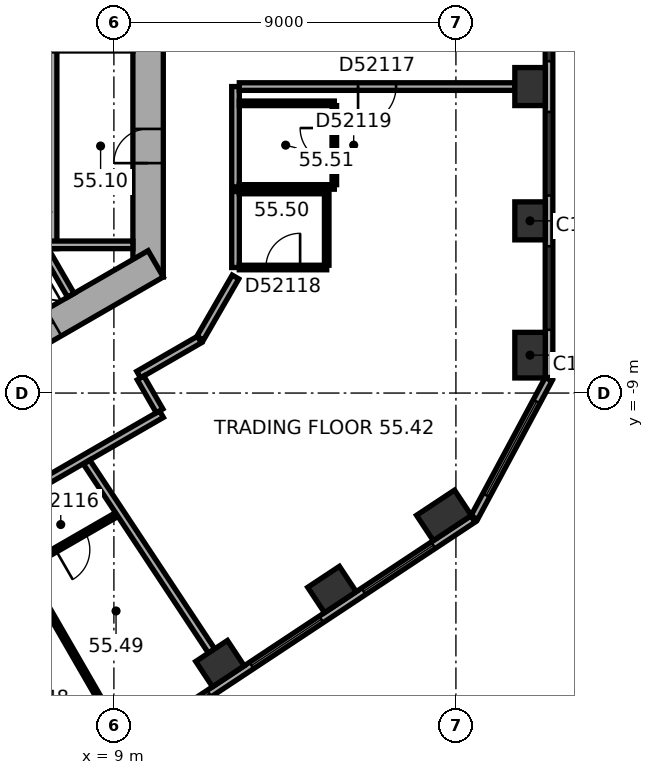
"""IFC4 building model, lengths in metres.
Left out: names, types, materials, properties, quantities, classifications, styles, units other than length and angle.
Written with IfcOpenShell. Run it as: python <this file> out.ifc"""

import sys

from ifc_helpers import new_model, si_unit, direction, frame, frame_2d, origin, origin_2d, place, context, subcontext, project, spatial, rectangle, extrude, element, fill, save


model = new_model("IFC4")
c1 = context("Model", 3, precision=1e-05, world=origin(), true_north=direction((0.0, 1.0)))
c2 = subcontext(c1, "Body", "Model", "MODEL_VIEW")
j1 = project(units=[si_unit("LENGTHUNIT", "METRE"), si_unit("PLANEANGLEUNIT", "RADIAN")], contexts=[c1])
p1 = place(None, origin())
s1 = spatial("IfcSite", under=j1, at=p1, CompositionType="ELEMENT")
p2 = place(p1, origin())
s2 = spatial("IfcBuilding", under=s1, at=p2, CompositionType="ELEMENT")
p3 = place(p2, frame((0.0, 0.0, 225.4)))
s3 = spatial("IfcBuildingStorey", under=s2, at=p3, CompositionType="ELEMENT", Elevation=225.4)
p4 = place(p3, frame((19.95, -8.003, 0.0), z_axis=(0.0, 0.0, 1.0), x_axis=(0.0, 1.0, 0.0)))
e1 = element("IfcColumn", 1, at=p4, inside=s3, PredefinedType="COLUMN", context=c2, shape_type="SweptSolid", body=[
    extrude(rectangle(XDim=1.2, YDim=0.8, at=origin_2d()), origin(), (0.0, 0.0, 1.0), 3.7),
])
for number, where, z_axis, x_axis in (
    (2, (19.95, -4.469, 0.0), (0.0, 0.0, 1.0), (0.0, 1.0, 0.0)),
    (3, (19.95, -0.936, 0.0), (0.0, 0.0, 1.0), (0.0, 1.0, 0.0)),
    (4, (11.791, -16.12, 0.0), (0.0, 0.0, 1.0), (0.834, 0.552, 0.0)),
    (5, (14.738, -14.169, 0.0), (0.0, 0.0, 1.0), (0.834, 0.552, 0.0)),
):
    element("IfcColumn", number, at=place(p3, frame(where, z_axis=z_axis, x_axis=x_axis)), inside=s3, PredefinedType="COLUMN", context=c2, shape_type="SweptSolid", body=[
        extrude(rectangle(XDim=1.0, YDim=0.8, at=origin_2d()), origin(), (0.0, 0.0, 1.0), 3.7),
    ])
p5 = place(p3, frame((17.685, -12.219, 0.0), z_axis=(0.0, 0.0, 1.0), x_axis=(0.833885822067, 0.551936985312, 0.0)))
e6 = element("IfcColumn", 6, at=p5, inside=s3, PredefinedType="COLUMN", context=c2, shape_type="SweptSolid", body=[
    extrude(rectangle(XDim=1.2, YDim=0.8, at=origin_2d()), origin(), (0.0, 0.0, 1.0), 3.7),
])
p6 = place(p3, frame((9.9, -5.947, 0.0), z_axis=(0.0, 0.0, 1.0), x_axis=(0.0, 1.0, 0.0)))
e7 = element("IfcWall", 7, at=p6, inside=s3, PredefinedType="SHEAR", context=c2, shape_type="SweptSolid", body=[
    extrude(rectangle(XDim=11.894, YDim=0.8, at=frame_2d((5.947, 0.0))), origin(), (0.0, 0.0, 1.0), 3.7),
])
p7 = place(p6, frame((6.147, 0.0, 0.0)))
e8 = element("IfcOpeningElement", 8, at=p7, cuts=e7, PredefinedType="OPENING", context=c2, shape_type="SweptSolid", body=[
    extrude(rectangle(XDim=1.5, YDim=2.1, at=frame_2d((0.75, 1.05))), frame((0.0, 0.41, 0.0), z_axis=(0.0, -1.0, 0.0), x_axis=(1.0, 0.0, 0.0)), (0.0, 0.0, 1.0), 0.82),
])
p8 = place(p6, frame((2.997, 0.0, 0.0)))
e9 = element("IfcOpeningElement", 9, at=p8, cuts=e7, PredefinedType="OPENING", context=c2, shape_type="SweptSolid", body=[
    extrude(rectangle(XDim=0.9, YDim=2.1, at=frame_2d((0.45, 1.05))), frame((0.0, 0.41, 0.0), z_axis=(0.0, -1.0, 0.0), x_axis=(1.0, 0.0, 0.0)), (0.0, 0.0, 1.0), 0.82),
])
p9 = place(p3, frame((-0.2, -11.547, 0.0), z_axis=(0.0, 0.0, 1.0), x_axis=(0.866023897231, 0.500002609418, 0.0)))
e10 = element("IfcWall", 10, at=p9, inside=s3, PredefinedType="SHEAR", context=c2, shape_type="SweptSolid", body=[
    extrude(rectangle(XDim=11.894, YDim=0.8, at=frame_2d((5.947, 0.0))), origin(), (0.0, 0.0, 1.0), 3.7),
])
p10 = place(p9, frame((2.497, 0.0, 0.0)))
e11 = element("IfcOpeningElement", 11, at=p10, cuts=e10, PredefinedType="OPENING", context=c2, shape_type="SweptSolid", body=[
    extrude(rectangle(XDim=1.1, YDim=2.1, at=frame_2d((0.55, 1.05))), frame((0.0, 0.41, 0.0), z_axis=(0.0, -1.0, 0.0), x_axis=(1.0, 0.0, 0.0)), (0.0, 0.0, 1.0), 0.82),
])
p11 = place(p9, frame((5.097, 0.0, 0.0)))
e12 = element("IfcOpeningElement", 12, at=p11, cuts=e10, PredefinedType="OPENING", context=c2, shape_type="SweptSolid", body=[
    extrude(rectangle(XDim=1.1, YDim=2.1, at=frame_2d((0.55, 1.05))), frame((0.0, 0.41, 0.0), z_axis=(0.0, -1.0, 0.0), x_axis=(1.0, 0.0, 0.0)), (0.0, 0.0, 1.0), 0.82),
])
p12 = place(p9, frame((7.697, 0.0, 0.0)))
e13 = element("IfcOpeningElement", 13, at=p12, cuts=e10, PredefinedType="OPENING", context=c2, shape_type="SweptSolid", body=[
    extrude(rectangle(XDim=1.1, YDim=2.1, at=frame_2d((0.55, 1.05))), frame((0.0, 0.41, 0.0), z_axis=(0.0, -1.0, 0.0), x_axis=(1.0, 0.0, 0.0)), (0.0, 0.0, 1.0), 0.82),
])
p13 = place(p3, frame((20.45, -8.59, 0.0), z_axis=(0.0, 0.0, 1.0), x_axis=(0.0, 1.0, 0.0)))
e14 = element("IfcWall", 14, at=p13, inside=s3, PredefinedType="STANDARD", context=c2, shape_type="SweptSolid", body=[
    extrude(rectangle(XDim=18.841, YDim=0.2, at=frame_2d((9.421, 0.0))), origin(), (0.0, 0.0, 1.0), 3.7),
])
p14 = place(p13, frame((1.254, 0.0, 0.9)))
e15 = element("IfcOpeningElement", 15, at=p14, cuts=e14, PredefinedType="OPENING", context=c2, shape_type="SweptSolid", body=[
    extrude(rectangle(XDim=2.2, YDim=2.0, at=frame_2d((1.1, 1.0))), frame((0.0, 0.11, 0.0), z_axis=(0.0, -1.0, 0.0), x_axis=(1.0, 0.0, 0.0)), (0.0, 0.0, 1.0), 0.22),
])
p15 = place(p13, frame((4.788, 0.0, 0.9)))
e16 = element("IfcOpeningElement", 16, at=p15, cuts=e14, PredefinedType="OPENING", context=c2, shape_type="SweptSolid", body=[
    extrude(rectangle(XDim=2.2, YDim=2.0, at=frame_2d((1.1, 1.0))), frame((0.0, 0.11, 0.0), z_axis=(0.0, -1.0, 0.0), x_axis=(1.0, 0.0, 0.0)), (0.0, 0.0, 1.0), 0.22),
])
p16 = place(p13, frame((8.322, 0.0, 0.9)))
e17 = element("IfcOpeningElement", 17, at=p16, cuts=e14, PredefinedType="OPENING", context=c2, shape_type="SweptSolid", body=[
    extrude(rectangle(XDim=2.2, YDim=2.0, at=frame_2d((1.1, 1.0))), frame((0.0, 0.11, 0.0), z_axis=(0.0, -1.0, 0.0), x_axis=(1.0, 0.0, 0.0)), (0.0, 0.0, 1.0), 0.22),
])
p17 = place(p13, frame((11.855, 0.0, 0.9)))
e18 = element("IfcOpeningElement", 18, at=p17, cuts=e14, PredefinedType="OPENING", context=c2, shape_type="SweptSolid", body=[
    extrude(rectangle(XDim=2.2, YDim=2.0, at=frame_2d((1.1, 1.0))), frame((0.0, 0.11, 0.0), z_axis=(0.0, -1.0, 0.0), x_axis=(1.0, 0.0, 0.0)), (0.0, 0.0, 1.0), 0.22),
])
p18 = place(p13, frame((15.389, 0.0, 0.9)))
e19 = element("IfcOpeningElement", 19, at=p18, cuts=e14, PredefinedType="OPENING", context=c2, shape_type="SweptSolid", body=[
    extrude(rectangle(XDim=2.2, YDim=2.0, at=frame_2d((1.1, 1.0))), frame((0.0, 0.11, 0.0), z_axis=(0.0, -1.0, 0.0), x_axis=(1.0, 0.0, 0.0)), (0.0, 0.0, 1.0), 0.22),
])
p19 = place(p3, frame((2.739, -22.711, 0.0), z_axis=(0.0, 0.0, 1.0), x_axis=(0.833885723098, 0.551937134838, 0.0)))
e20 = element("IfcWall", 20, at=p19, inside=s3, PredefinedType="STANDARD", context=c2, shape_type="SweptSolid", body=[
    extrude(rectangle(XDim=18.841, YDim=0.2, at=frame_2d((9.421, 0.0))), origin(), (0.0, 0.0, 1.0), 3.7),
])
p20 = place(p19, frame((1.252, 0.0, 0.9)))
e21 = element("IfcOpeningElement", 21, at=p20, cuts=e20, PredefinedType="OPENING", context=c2, shape_type="SweptSolid", body=[
    extrude(rectangle(XDim=2.2, YDim=2.0, at=frame_2d((1.1, 1.0))), frame((0.0, 0.11, 0.0), z_axis=(0.0, -1.0, 0.0), x_axis=(1.0, 0.0, 0.0)), (0.0, 0.0, 1.0), 0.22),
])
p21 = place(p19, frame((4.786, 0.0, 0.9)))
e22 = element("IfcOpeningElement", 22, at=p21, cuts=e20, PredefinedType="OPENING", context=c2, shape_type="SweptSolid", body=[
    extrude(rectangle(XDim=2.2, YDim=2.0, at=frame_2d((1.1, 1.0))), frame((0.0, 0.11, 0.0), z_axis=(0.0, -1.0, 0.0), x_axis=(1.0, 0.0, 0.0)), (0.0, 0.0, 1.0), 0.22),
])
p22 = place(p19, frame((8.32, 0.0, 0.9)))
e23 = element("IfcOpeningElement", 23, at=p22, cuts=e20, PredefinedType="OPENING", context=c2, shape_type="SweptSolid", body=[
    extrude(rectangle(XDim=2.2, YDim=2.0, at=frame_2d((1.1, 1.0))), frame((0.0, 0.11, 0.0), z_axis=(0.0, -1.0, 0.0), x_axis=(1.0, 0.0, 0.0)), (0.0, 0.0, 1.0), 0.22),
])
p23 = place(p19, frame((11.854, 0.0, 0.9)))
e24 = element("IfcOpeningElement", 24, at=p23, cuts=e20, PredefinedType="OPENING", context=c2, shape_type="SweptSolid", body=[
    extrude(rectangle(XDim=2.2, YDim=2.0, at=frame_2d((1.1, 1.0))), frame((0.0, 0.11, 0.0), z_axis=(0.0, -1.0, 0.0), x_axis=(1.0, 0.0, 0.0)), (0.0, 0.0, 1.0), 0.22),
])
p24 = place(p19, frame((15.387, 0.0, 0.9)))
e25 = element("IfcOpeningElement", 25, at=p24, cuts=e20, PredefinedType="OPENING", context=c2, shape_type="SweptSolid", body=[
    extrude(rectangle(XDim=2.2, YDim=2.0, at=frame_2d((1.1, 1.0))), frame((0.0, 0.11, 0.0), z_axis=(0.0, -1.0, 0.0), x_axis=(1.0, 0.0, 0.0)), (0.0, 0.0, 1.0), 0.22),
])
p25 = place(p3, frame((18.483, -12.276, 0.0), z_axis=(0.0, 0.0, 1.0), x_axis=(0.473267675015, 0.880918672629, 0.0)))
e26 = element("IfcWall", 26, at=p25, inside=s3, PredefinedType="STANDARD", context=c2, shape_type="SweptSolid", body=[
    extrude(rectangle(XDim=4.13, YDim=0.2, at=frame_2d((2.065, 0.0))), origin(), (0.0, 0.0, 1.0), 3.7),
])
p26 = place(p25, frame((0.665, 0.0, 0.9)))
e27 = element("IfcOpeningElement", 27, at=p26, cuts=e26, PredefinedType="OPENING", context=c2, shape_type="SweptSolid", body=[
    extrude(rectangle(XDim=2.8, YDim=2.0, at=frame_2d((1.4, 1.0))), frame((0.0, 0.11, 0.0), z_axis=(0.0, -1.0, 0.0), x_axis=(1.0, 0.0, 0.0)), (0.0, 0.0, 1.0), 0.22),
])
p27 = place(p3, frame((7.4, -5.2, 0.0), z_axis=(0.0, 0.0, 1.0), x_axis=(0.0, 1.0, 0.0)))
e28 = element("IfcWall", 28, at=p27, inside=s3, PredefinedType="PARTITIONING", context=c2, shape_type="SweptSolid", body=[
    extrude(rectangle(XDim=5.4, YDim=0.2, at=frame_2d((2.7, 0.0))), origin(), (0.0, 0.0, 1.0), 3.42),
])
for number, where, z_axis, x_axis in (
    (29, (7.3, -5.1, 0.0), (0.0, 0.0, 1.0), (1.0, 0.0, 0.0)),
    (30, (6.768, -4.522, 0.0), (0.0, 0.0, 1.0), (0.5, -0.866, 0.0)),
):
    element("IfcWall", number, at=place(p3, frame(where, z_axis=z_axis, x_axis=x_axis)), inside=s3, PredefinedType="PARTITIONING", context=c2, shape_type="SweptSolid", body=[
        extrude(rectangle(XDim=2.2, YDim=0.2, at=frame_2d((1.1, 0.0))), origin(), (0.0, 0.0, 1.0), 3.42),
    ])
p28 = place(p3, frame((2.716, -13.906, 0.0), z_axis=(0.0, 0.0, 1.0), x_axis=(0.866040290674, 0.499974214264, 0.0)))
e31 = element("IfcWall", 31, at=p28, inside=s3, PredefinedType="PARTITIONING", context=c2, shape_type="SweptSolid", body=[
    extrude(rectangle(XDim=8.702, YDim=0.2, at=frame_2d((4.351, 0.0))), origin(), (0.0, 0.0, 1.0), 3.42),
])
p29 = place(p28, frame((2.679, 0.0, 0.0)))
e32 = element("IfcOpeningElement", 32, at=p29, cuts=e31, PredefinedType="OPENING", context=c2, shape_type="SweptSolid", body=[
    extrude(rectangle(XDim=1.0, YDim=2.1, at=frame_2d((0.5, 1.05))), frame((0.0, 0.11, 0.0), z_axis=(0.0, -1.0, 0.0), x_axis=(1.0, 0.0, 0.0)), (0.0, 0.0, 1.0), 0.22),
])
p30 = place(p3, frame((3.117, -15.638, 0.0), z_axis=(0.0, 0.0, 1.0), x_axis=(0.866031365477, 0.499989673903, 0.0)))
e33 = element("IfcWall", 33, at=p30, inside=s3, PredefinedType="PARTITIONING", context=c2, shape_type="SweptSolid", body=[
    extrude(rectangle(XDim=6.881, YDim=0.12, at=frame_2d((3.44, 0.0))), origin(), (0.0, 0.0, 1.0), 3.42),
])
p31 = place(p30, frame((0.5, 0.0, 0.0)))
e34 = element("IfcOpeningElement", 34, at=p31, cuts=e33, PredefinedType="OPENING", context=c2, shape_type="SweptSolid", body=[
    extrude(rectangle(XDim=1.0, YDim=2.1, at=frame_2d((0.5, 1.05))), frame((0.0, 0.07, 0.0), z_axis=(0.0, -1.0, 0.0), x_axis=(1.0, 0.0, 0.0)), (0.0, 0.0, 1.0), 0.14),
])
p32 = place(p30, frame((2.583, 0.0, 0.0)))
e35 = element("IfcOpeningElement", 35, at=p32, cuts=e33, PredefinedType="OPENING", context=c2, shape_type="SweptSolid", body=[
    extrude(rectangle(XDim=0.9, YDim=2.1, at=frame_2d((0.45, 1.05))), frame((0.0, 0.07, 0.0), z_axis=(0.0, -1.0, 0.0), x_axis=(1.0, 0.0, 0.0)), (0.0, 0.0, 1.0), 0.14),
])
p33 = place(p30, frame((5.023, 0.0, 0.0)))
e36 = element("IfcOpeningElement", 36, at=p33, cuts=e33, PredefinedType="OPENING", context=c2, shape_type="SweptSolid", body=[
    extrude(rectangle(XDim=0.9, YDim=2.1, at=frame_2d((0.45, 1.05))), frame((0.0, 0.07, 0.0), z_axis=(0.0, -1.0, 0.0), x_axis=(1.0, 0.0, 0.0)), (0.0, 0.0, 1.0), 0.14),
])
p34 = place(p3, frame((8.912, -17.545, 0.0), z_axis=(0.0, 0.0, 1.0), x_axis=(-0.500022113525, 0.866012636158, 0.0)))
e37 = element("IfcWall", 37, at=p34, inside=s3, PredefinedType="PARTITIONING", context=c2, shape_type="SweptSolid", body=[
    extrude(rectangle(XDim=4.49, YDim=0.12, at=frame_2d((2.245, 0.0))), origin(), (0.0, 0.0, 1.0), 2.87),
])
p35 = place(p3, frame((9.652, -8.515, 0.0), z_axis=(0.0, 0.0, 1.0), x_axis=(0.866020375458, 0.500008709215, 0.0)))
e38 = element("IfcWall", 38, at=p35, inside=s3, PredefinedType="PARTITIONING", context=c2, shape_type="SweptSolid", body=[
    extrude(rectangle(XDim=1.846, YDim=0.2, at=frame_2d((0.923, 0.0))), origin(), (0.0, 0.0, 1.0), 3.42),
])
p36 = place(p3, frame((10.202, -9.469, 0.0), z_axis=(0.0, 0.0, 1.0), x_axis=(-0.499968756647, 0.866043441391, 0.0)))
e39 = element("IfcWall", 39, at=p36, inside=s3, PredefinedType="PARTITIONING", context=c2, shape_type="SweptSolid", body=[
    extrude(rectangle(XDim=1.001, YDim=0.2, at=frame_2d((0.5, 0.0))), origin(), (0.0, 0.0, 1.0), 3.42),
])
p37 = place(p3, frame((11.27, -7.558, 0.0), z_axis=(0.0, 0.0, 1.0), x_axis=(0.499964847546, 0.866045698112, 0.0)))
e40 = element("IfcWall", 40, at=p37, inside=s3, PredefinedType="PARTITIONING", context=c2, shape_type="SweptSolid", body=[
    extrude(rectangle(XDim=1.86, YDim=0.2, at=frame_2d((0.93, 0.0))), origin(), (0.0, 0.0, 1.0), 3.42),
])
p38 = place(p3, frame((11.571, -15.786, 0.0), z_axis=(0.0, 0.0, 1.0), x_axis=(-0.551944861763, 0.833880608705, 0.0)))
e41 = element("IfcWall", 41, at=p38, inside=s3, PredefinedType="PARTITIONING", context=c2, shape_type="SweptSolid", body=[
    extrude(rectangle(XDim=5.957, YDim=0.2, at=frame_2d((2.979, 0.0))), origin(), (0.0, 0.0, 1.0), 3.42),
])
p39 = place(p3, frame((12.2, -5.697, 0.0), z_axis=(0.0, 0.0, 1.0), x_axis=(0.0, 1.0, 0.0)))
e42 = element("IfcWall", 42, at=p39, inside=s3, PredefinedType="PARTITIONING", context=c2, shape_type="SweptSolid", body=[
    extrude(rectangle(XDim=2.0, YDim=0.2, at=frame_2d((1.0, 0.0))), origin(), (0.0, 0.0, 1.0), 3.42),
])
p40 = place(p3, frame((12.2, -3.577, 0.0), z_axis=(0.0, 0.0, 1.0), x_axis=(0.0, 1.0, 0.0)))
e43 = element("IfcWall", 43, at=p40, inside=s3, PredefinedType="PARTITIONING", context=c2, shape_type="SweptSolid", body=[
    extrude(rectangle(XDim=2.641, YDim=0.2, at=frame_2d((1.321, 0.0))), origin(), (0.0, 0.0, 1.0), 3.42),
])
p41 = place(p3, frame((12.3, -3.697, 0.0), z_axis=(0.0, 0.0, 1.0), x_axis=(1.0, 0.0, 0.0)))
e44 = element("IfcWall", 44, at=p41, inside=s3, PredefinedType="PARTITIONING", context=c2, shape_type="SweptSolid", body=[
    extrude(rectangle(XDim=2.3, YDim=0.12, at=frame_2d((1.15, 0.0))), origin(), (0.0, 0.0, 1.0), 3.42),
])
p42 = place(p3, frame((12.3, -1.377, 0.0), z_axis=(0.0, 0.0, 1.0), x_axis=(1.0, 0.0, 0.0)))
e45 = element("IfcWall", 45, at=p42, inside=s3, PredefinedType="PARTITIONING", context=c2, shape_type="SweptSolid", body=[
    extrude(rectangle(XDim=2.5, YDim=0.12, at=frame_2d((1.25, 0.0))), origin(), (0.0, 0.0, 1.0), 3.42),
])
p43 = place(p3, frame((12.3, -0.936, 0.0), z_axis=(0.0, 0.0, 1.0), x_axis=(1.0, 0.0, 0.0)))
e46 = element("IfcWall", 46, at=p43, inside=s3, PredefinedType="PARTITIONING", context=c2, shape_type="SweptSolid", body=[
    extrude(rectangle(XDim=7.25, YDim=0.2, at=frame_2d((3.625, 0.0))), origin(), (0.0, 0.0, 1.0), 2.87),
])
p44 = place(p43, frame((3.125, 0.0, 0.0)))
e47 = element("IfcOpeningElement", 47, at=p44, cuts=e46, PredefinedType="OPENING", context=c2, shape_type="SweptSolid", body=[
    extrude(rectangle(XDim=1.0, YDim=2.1, at=frame_2d((0.5, 1.05))), frame((0.0, 0.11, 0.0), z_axis=(0.0, -1.0, 0.0), x_axis=(1.0, 0.0, 0.0)), (0.0, 0.0, 1.0), 0.22),
])
p45 = place(p3, frame((14.6, -5.697, 0.0), z_axis=(0.0, 0.0, 1.0), x_axis=(-1.0, 0.0, 0.0)))
e48 = element("IfcWall", 48, at=p45, inside=s3, PredefinedType="PARTITIONING", context=c2, shape_type="SweptSolid", body=[
    extrude(rectangle(XDim=2.3, YDim=0.12, at=frame_2d((1.15, 0.0))), origin(), (0.0, 0.0, 1.0), 3.42),
])
p46 = place(p45, frame((0.7, 0.0, 0.0)))
e49 = element("IfcOpeningElement", 49, at=p46, cuts=e48, PredefinedType="OPENING", context=c2, shape_type="SweptSolid", body=[
    extrude(rectangle(XDim=0.9, YDim=2.1, at=frame_2d((0.45, 1.05))), frame((0.0, 0.07, 0.0), z_axis=(0.0, -1.0, 0.0), x_axis=(1.0, 0.0, 0.0)), (0.0, 0.0, 1.0), 0.14),
])
p47 = place(p3, frame((14.6, -3.757, 0.0), z_axis=(0.0, 0.0, 1.0), x_axis=(0.0, -1.0, 0.0)))
e50 = element("IfcWall", 50, at=p47, inside=s3, PredefinedType="PARTITIONING", context=c2, shape_type="SweptSolid", body=[
    extrude(rectangle(XDim=1.88, YDim=0.12, at=frame_2d((0.94, 0.0))), origin(), (0.0, 0.0, 1.0), 3.42),
])
p48 = place(p3, frame((14.8, -3.577, 0.0), z_axis=(0.0, 0.0, 1.0), x_axis=(-1.0, 0.0, 0.0)))
e51 = element("IfcWall", 51, at=p48, inside=s3, PredefinedType="PARTITIONING", context=c2, shape_type="SweptSolid", body=[
    extrude(rectangle(XDim=2.5, YDim=0.12, at=frame_2d((1.25, 0.0))), origin(), (0.0, 0.0, 1.0), 3.42),
])
p49 = place(p3, frame((14.8, -1.437, 0.0), z_axis=(0.0, 0.0, 1.0), x_axis=(0.0, -1.0, 0.0)))
e52 = element("IfcWall", 52, at=p49, inside=s3, PredefinedType="PARTITIONING", context=c2, shape_type="SweptSolid", body=[
    extrude(rectangle(XDim=2.08, YDim=0.12, at=frame_2d((1.04, 0.0))), origin(), (0.0, 0.0, 1.0), 3.42),
])
p50 = place(p49, frame((0.59, 0.0, 0.0)))
e53 = element("IfcOpeningElement", 53, at=p50, cuts=e52, PredefinedType="OPENING", context=c2, shape_type="SweptSolid", body=[
    extrude(rectangle(XDim=0.9, YDim=2.1, at=frame_2d((0.45, 1.05))), frame((0.0, 0.07, 0.0), z_axis=(0.0, -1.0, 0.0), x_axis=(1.0, 0.0, 0.0)), (0.0, 0.0, 1.0), 0.14),
])
p51 = place(p14, origin())
e54 = element("IfcWindow", 54, at=p51, inside=s3, PartitioningType="SINGLE_PANEL", PredefinedType="WINDOW", context=c2, shape_type="SweptSolid", body=[
    extrude(rectangle(XDim=2.2, YDim=2.0, at=frame_2d((1.1, 1.0))), frame((0.0, 0.03, 0.0), z_axis=(0.0, -1.0, 0.0), x_axis=(1.0, 0.0, 0.0)), (0.0, 0.0, 1.0), 0.06),
])
fill(e15, e54)
p52 = place(p15, origin())
e55 = element("IfcWindow", 55, at=p52, inside=s3, PartitioningType="SINGLE_PANEL", PredefinedType="WINDOW", context=c2, shape_type="SweptSolid", body=[
    extrude(rectangle(XDim=2.2, YDim=2.0, at=frame_2d((1.1, 1.0))), frame((0.0, 0.03, 0.0), z_axis=(0.0, -1.0, 0.0), x_axis=(1.0, 0.0, 0.0)), (0.0, 0.0, 1.0), 0.06),
])
fill(e16, e55)
p53 = place(p16, origin())
e56 = element("IfcWindow", 56, at=p53, inside=s3, PartitioningType="SINGLE_PANEL", PredefinedType="WINDOW", context=c2, shape_type="SweptSolid", body=[
    extrude(rectangle(XDim=2.2, YDim=2.0, at=frame_2d((1.1, 1.0))), frame((0.0, 0.03, 0.0), z_axis=(0.0, -1.0, 0.0), x_axis=(1.0, 0.0, 0.0)), (0.0, 0.0, 1.0), 0.06),
])
fill(e17, e56)
p54 = place(p22, origin())
e57 = element("IfcWindow", 57, at=p54, inside=s3, PartitioningType="SINGLE_PANEL", PredefinedType="WINDOW", context=c2, shape_type="SweptSolid", body=[
    extrude(rectangle(XDim=2.2, YDim=2.0, at=frame_2d((1.1, 1.0))), frame((0.0, 0.03, 0.0), z_axis=(0.0, -1.0, 0.0), x_axis=(1.0, 0.0, 0.0)), (0.0, 0.0, 1.0), 0.06),
])
fill(e23, e57)
p55 = place(p23, origin())
e58 = element("IfcWindow", 58, at=p55, inside=s3, PartitioningType="SINGLE_PANEL", PredefinedType="WINDOW", context=c2, shape_type="SweptSolid", body=[
    extrude(rectangle(XDim=2.2, YDim=2.0, at=frame_2d((1.1, 1.0))), frame((0.0, 0.03, 0.0), z_axis=(0.0, -1.0, 0.0), x_axis=(1.0, 0.0, 0.0)), (0.0, 0.0, 1.0), 0.06),
])
fill(e24, e58)
p56 = place(p24, origin())
e59 = element("IfcWindow", 59, at=p56, inside=s3, PartitioningType="SINGLE_PANEL", PredefinedType="WINDOW", context=c2, shape_type="SweptSolid", body=[
    extrude(rectangle(XDim=2.2, YDim=2.0, at=frame_2d((1.1, 1.0))), frame((0.0, 0.03, 0.0), z_axis=(0.0, -1.0, 0.0), x_axis=(1.0, 0.0, 0.0)), (0.0, 0.0, 1.0), 0.06),
])
fill(e25, e59)
p57 = place(p26, origin())
e60 = element("IfcWindow", 60, at=p57, inside=s3, PartitioningType="SINGLE_PANEL", PredefinedType="WINDOW", context=c2, shape_type="SweptSolid", body=[
    extrude(rectangle(XDim=2.8, YDim=2.0, at=frame_2d((1.4, 1.0))), frame((0.0, 0.03, 0.0), z_axis=(0.0, -1.0, 0.0), x_axis=(1.0, 0.0, 0.0)), (0.0, 0.0, 1.0), 0.06),
])
fill(e27, e60)
p58 = place(p8, origin())
e61 = element("IfcDoor", 61, at=p58, inside=s3, OperationType="SINGLE_SWING_LEFT", PredefinedType="DOOR", context=c2, shape_type="SweptSolid", body=[
    extrude(rectangle(XDim=0.9, YDim=2.1, at=frame_2d((0.45, 1.05))), frame((0.0, 0.025, 0.0), z_axis=(0.0, -1.0, 0.0), x_axis=(1.0, 0.0, 0.0)), (0.0, 0.0, 1.0), 0.05),
])
fill(e9, e61)
p59 = place(p12, origin())
e62 = element("IfcDoor", 62, at=p59, inside=s3, OperationType="DOUBLE_DOOR_SLIDING", PredefinedType="DOOR", context=c2, shape_type="SweptSolid", body=[
    extrude(rectangle(XDim=1.1, YDim=2.1, at=frame_2d((0.55, 1.05))), frame((0.0, 0.025, 0.0), z_axis=(0.0, -1.0, 0.0), x_axis=(1.0, 0.0, 0.0)), (0.0, 0.0, 1.0), 0.05),
])
fill(e13, e62)
p60 = place(p33, origin())
e63 = element("IfcDoor", 63, at=p60, inside=s3, OperationType="SINGLE_SWING_LEFT", PredefinedType="DOOR", context=c2, shape_type="SweptSolid", body=[
    extrude(rectangle(XDim=0.9, YDim=2.1, at=frame_2d((0.45, 1.05))), frame((0.0, 0.025, 0.0), z_axis=(0.0, -1.0, 0.0), x_axis=(1.0, 0.0, 0.0)), (0.0, 0.0, 1.0), 0.05),
])
fill(e36, e63)
p61 = place(p44, origin())
e64 = element("IfcDoor", 64, at=p61, inside=s3, OperationType="SINGLE_SWING_LEFT", PredefinedType="DOOR", context=c2, shape_type="SweptSolid", body=[
    extrude(rectangle(XDim=1.0, YDim=2.1, at=frame_2d((0.5, 1.05))), frame((0.0, 0.025, 0.0), z_axis=(0.0, -1.0, 0.0), x_axis=(1.0, 0.0, 0.0)), (0.0, 0.0, 1.0), 0.05),
])
fill(e47, e64)
p62 = place(p46, origin())
e65 = element("IfcDoor", 65, at=p62, inside=s3, OperationType="SINGLE_SWING_LEFT", PredefinedType="DOOR", context=c2, shape_type="SweptSolid", body=[
    extrude(rectangle(XDim=0.9, YDim=2.1, at=frame_2d((0.45, 1.05))), frame((0.0, 0.025, 0.0), z_axis=(0.0, -1.0, 0.0), x_axis=(1.0, 0.0, 0.0)), (0.0, 0.0, 1.0), 0.05),
])
fill(e49, e65)
p63 = place(p50, origin())
e66 = element("IfcDoor", 66, at=p63, inside=s3, OperationType="SINGLE_SWING_LEFT", PredefinedType="DOOR", context=c2, shape_type="SweptSolid", body=[
    extrude(rectangle(XDim=0.9, YDim=2.1, at=frame_2d((0.45, 1.05))), frame((0.0, 0.025, 0.0), z_axis=(0.0, -1.0, 0.0), x_axis=(1.0, 0.0, 0.0)), (0.0, 0.0, 1.0), 0.05),
])
fill(e53, e66)
save(model, sys.argv[1])
